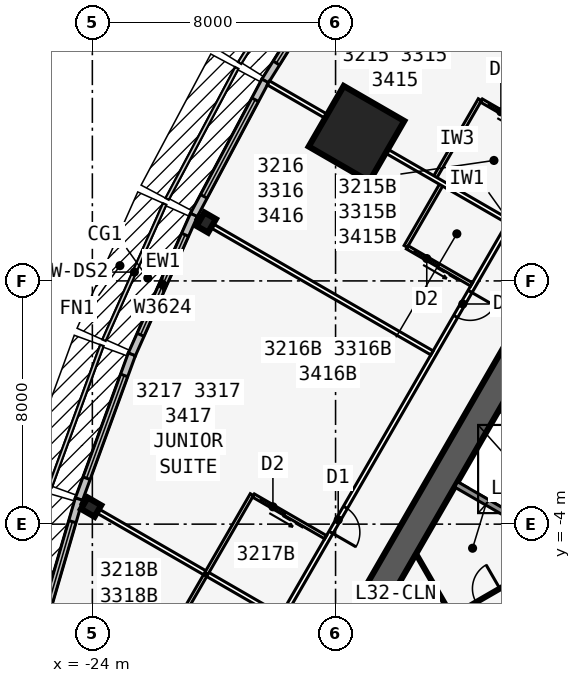
"""IFC4 building model, lengths in metres.
Left out: names, types, materials, properties, quantities, classifications, styles, units other than length and angle.
Written with IfcOpenShell. Run it as: python <this file> out.ifc"""

import sys

from ifc_helpers import new_model, si_unit, direction, frame, frame_2d, origin, origin_2d, place, context, subcontext, project, spatial, rectangle, i_section, extrude, element, fill, save


model = new_model("IFC4")
c1 = context("Model", 3, precision=1e-05, world=origin(), true_north=direction((0.0, 1.0)))
c2 = subcontext(c1, "Body", "Model", "MODEL_VIEW")
j1 = project(units=[si_unit("LENGTHUNIT", "METRE"), si_unit("PLANEANGLEUNIT", "RADIAN")], contexts=[c1])
p1 = place(None, origin())
s1 = spatial("IfcSite", under=j1, at=p1, CompositionType="ELEMENT")
p2 = place(p1, origin())
s2 = spatial("IfcBuilding", under=s1, at=p2, CompositionType="ELEMENT")
p3 = place(p2, frame((0.0, 0.0, 124.9)))
s3 = spatial("IfcBuildingStorey", under=s2, at=p3, CompositionType="ELEMENT", Elevation=124.9)
p4 = place(p3, frame((0.0, 19.052, 0.0), z_axis=(0.0, 0.0, 1.0), x_axis=(-0.499999749417, -0.866025548458, 0.0)))
e1 = element("IfcWall", 1, at=p4, inside=s3, PredefinedType="SHEAR", context=c2, shape_type="SweptSolid", body=[
    extrude(rectangle(XDim=33.0, YDim=0.9, at=frame_2d((16.5, 0.0))), origin(), (0.0, 0.0, 1.0), 3.4),
])
p5 = place(p4, frame((14.15, 0.0, 0.0)))
e2 = element("IfcOpeningElement", 2, at=p5, cuts=e1, PredefinedType="OPENING", context=c2, shape_type="SweptSolid", body=[
    extrude(rectangle(XDim=1.8, YDim=2.13, at=frame_2d((0.9, 1.065))), frame((0.0, 0.46, 0.0), z_axis=(0.0, -1.0, 0.0), x_axis=(1.0, 0.0, 0.0)), (0.0, 0.0, 1.0), 0.92),
])
p6 = place(p4, frame((12.6, 0.0, 0.0)))
e3 = element("IfcOpeningElement", 3, at=p6, cuts=e1, PredefinedType="OPENING", context=c2, shape_type="SweptSolid", body=[
    extrude(rectangle(XDim=1.0, YDim=2.13, at=frame_2d((0.5, 1.065))), frame((0.0, 0.46, 0.0), z_axis=(0.0, -1.0, 0.0), x_axis=(1.0, 0.0, 0.0)), (0.0, 0.0, 1.0), 0.92),
])
for number, where, z_axis, x_axis in (
    (4, (-7.879, -1.744, 0.0), (0.0, 0.0, 1.0), (-0.866, 0.5, 0.0)),
    (5, (-9.329, -4.256, 0.0), (0.0, 0.0, 1.0), (-0.866, 0.5, 0.0)),
):
    element("IfcWall", number, at=place(p3, frame(where, z_axis=z_axis, x_axis=x_axis)), inside=s3, PredefinedType="SOLIDWALL", context=c2, shape_type="SweptSolid", body=[
        extrude(rectangle(XDim=3.125, YDim=0.2, at=frame_2d((1.562, 0.0))), origin(), (0.0, 0.0, 1.0), 3.235),
    ])
for number, where, z_axis, x_axis in (
    (6, (-20.254, 5.92, 0.0), (0.0, 0.0, 1.0), (-0.866, 0.5, 0.0)),
    (7, (-24.041, -3.44, 0.0), (0.0, 0.0, 1.0), (-0.5, -0.866, 0.0)),
):
    element("IfcColumn", number, at=place(p3, frame(where, z_axis=z_axis, x_axis=x_axis)), inside=s3, PredefinedType="COLUMN", context=c2, shape_type="SweptSolid", body=[
        extrude(i_section(OverallWidth=0.437, OverallDepth=0.513, WebThickness=0.061, FlangeThickness=0.097, at=origin_2d()), origin(), (0.0, 0.0, 1.0), 3.4),
    ])
p7 = place(p3, frame((-15.312, 8.84, 0.0), z_axis=(0.0, 0.0, 1.0), x_axis=(-0.866025403784, 0.5, 0.0)))
e8 = element("IfcColumn", 8, at=p7, inside=s3, PredefinedType="COLUMN", context=c2, shape_type="SweptSolid", body=[
    extrude(rectangle(XDim=2.3, YDim=2.3, at=origin_2d()), origin(), (0.0, 0.0, 1.0), 3.4),
])
p8 = place(p3, frame((-15.667, 14.814, 0.0), z_axis=(0.0, 0.0, 1.0), x_axis=(-0.529990167382, -0.84800378683, 0.0)))
e9 = element("IfcWall", 9, at=p8, inside=s3, PredefinedType="STANDARD", context=c2, shape_type="SweptSolid", body=[
    extrude(rectangle(XDim=5.003, YDim=0.25, at=frame_2d((2.501, 0.0))), origin(), (0.0, 0.0, 1.0), 3.235),
])
p9 = place(p8, frame((0.701, 0.0, 0.45)))
e10 = element("IfcOpeningElement", 10, at=p9, cuts=e9, PredefinedType="OPENING", context=c2, shape_type="SweptSolid", body=[
    extrude(rectangle(XDim=3.6, YDim=2.4, at=frame_2d((1.8, 1.2))), frame((0.0, 0.135, 0.0), z_axis=(0.0, -1.0, 0.0), x_axis=(1.0, 0.0, 0.0)), (0.0, 0.0, 1.0), 0.27),
])
p10 = place(p3, frame((-18.314, 10.579, 0.0), z_axis=(0.0, 0.0, 1.0), x_axis=(-0.469404966864, -0.882982999317, 0.0)))
e11 = element("IfcWall", 11, at=p10, inside=s3, PredefinedType="STANDARD", context=c2, shape_type="SweptSolid", body=[
    extrude(rectangle(XDim=5.003, YDim=0.25, at=frame_2d((2.501, 0.0))), origin(), (0.0, 0.0, 1.0), 3.235),
])
p11 = place(p10, frame((0.701, 0.0, 0.45)))
e12 = element("IfcOpeningElement", 12, at=p11, cuts=e11, PredefinedType="OPENING", context=c2, shape_type="SweptSolid", body=[
    extrude(rectangle(XDim=3.6, YDim=2.4, at=frame_2d((1.8, 1.2))), frame((0.0, 0.135, 0.0), z_axis=(0.0, -1.0, 0.0), x_axis=(1.0, 0.0, 0.0)), (0.0, 0.0, 1.0), 0.27),
])
p12 = place(p3, frame((-20.659, 6.169, 0.0), z_axis=(0.0, 0.0, 1.0), x_axis=(-0.406832200364, -0.913502906808, 0.0)))
e13 = element("IfcWall", 13, at=p12, inside=s3, PredefinedType="STANDARD", context=c2, shape_type="SweptSolid", body=[
    extrude(rectangle(XDim=5.028, YDim=0.25, at=frame_2d((2.514, 0.0))), origin(), (0.0, 0.0, 1.0), 3.235),
])
p13 = place(p12, frame((0.714, 0.0, 0.45)))
e14 = element("IfcOpeningElement", 14, at=p13, cuts=e13, PredefinedType="OPENING", context=c2, shape_type="SweptSolid", body=[
    extrude(rectangle(XDim=3.6, YDim=2.4, at=frame_2d((1.8, 1.2))), frame((0.0, 0.135, 0.0), z_axis=(0.0, -1.0, 0.0), x_axis=(1.0, 0.0, 0.0)), (0.0, 0.0, 1.0), 0.27),
])
p14 = place(p3, frame((-22.701, 1.584, 0.0), z_axis=(0.0, 0.0, 1.0), x_axis=(-0.343225593282, -0.939252996863, 0.0)))
e15 = element("IfcWall", 15, at=p14, inside=s3, PredefinedType="STANDARD", context=c2, shape_type="SweptSolid", body=[
    extrude(rectangle(XDim=5.076, YDim=0.25, at=frame_2d((2.538, 0.0))), origin(), (0.0, 0.0, 1.0), 3.235),
])
p15 = place(p14, frame((0.738, 0.0, 0.45)))
e16 = element("IfcOpeningElement", 16, at=p15, cuts=e15, PredefinedType="OPENING", context=c2, shape_type="SweptSolid", body=[
    extrude(rectangle(XDim=3.6, YDim=2.4, at=frame_2d((1.8, 1.2))), frame((0.0, 0.135, 0.0), z_axis=(0.0, -1.0, 0.0), x_axis=(1.0, 0.0, 0.0)), (0.0, 0.0, 1.0), 0.27),
])
p16 = place(p3, frame((-24.441, -3.175, 0.0), z_axis=(0.0, 0.0, 1.0), x_axis=(-0.279528287117, -0.960137457191, 0.0)))
e17 = element("IfcWall", 17, at=p16, inside=s3, PredefinedType="STANDARD", context=c2, shape_type="SweptSolid", body=[
    extrude(rectangle(XDim=5.148, YDim=0.25, at=frame_2d((2.574, 0.0))), origin(), (0.0, 0.0, 1.0), 3.235),
])
p17 = place(p16, frame((0.774, 0.0, 0.45)))
e18 = element("IfcOpeningElement", 18, at=p17, cuts=e17, PredefinedType="OPENING", context=c2, shape_type="SweptSolid", body=[
    extrude(rectangle(XDim=3.6, YDim=2.4, at=frame_2d((1.8, 1.2))), frame((0.0, 0.135, 0.0), z_axis=(0.0, -1.0, 0.0), x_axis=(1.0, 0.0, 0.0)), (0.0, 0.0, 1.0), 0.27),
])
p18 = place(p3, frame((-0.5, 22.836, 0.0), z_axis=(0.0, 0.0, 1.0), x_axis=(-0.500001677587, -0.866024435227, 0.0)))
e19 = element("IfcWall", 19, at=p18, inside=s3, PredefinedType="PARTITIONING", context=c2, shape_type="SweptSolid", body=[
    extrude(rectangle(XDim=39.054, YDim=0.15, at=frame_2d((19.527, 0.0))), origin(), (0.0, 0.0, 1.0), 3.235),
])
p19 = place(p18, frame((0.352, 0.0, 0.0)))
e20 = element("IfcOpeningElement", 20, at=p19, cuts=e19, PredefinedType="OPENING", context=c2, shape_type="SweptSolid", body=[
    extrude(rectangle(XDim=0.95, YDim=2.13, at=frame_2d((0.475, 1.065))), frame((0.0, 0.085, 0.0), z_axis=(0.0, -1.0, 0.0), x_axis=(1.0, 0.0, 0.0)), (0.0, 0.0, 1.0), 0.17),
])
p20 = place(p18, frame((5.952, 0.0, 0.0)))
e21 = element("IfcOpeningElement", 21, at=p20, cuts=e19, PredefinedType="OPENING", context=c2, shape_type="SweptSolid", body=[
    extrude(rectangle(XDim=0.95, YDim=2.13, at=frame_2d((0.475, 1.065))), frame((0.0, 0.085, 0.0), z_axis=(0.0, -1.0, 0.0), x_axis=(1.0, 0.0, 0.0)), (0.0, 0.0, 1.0), 0.17),
])
p21 = place(p18, frame((12.152, 0.0, 0.0)))
e22 = element("IfcOpeningElement", 22, at=p21, cuts=e19, PredefinedType="OPENING", context=c2, shape_type="SweptSolid", body=[
    extrude(rectangle(XDim=0.95, YDim=2.13, at=frame_2d((0.475, 1.065))), frame((0.0, 0.085, 0.0), z_axis=(0.0, -1.0, 0.0), x_axis=(1.0, 0.0, 0.0)), (0.0, 0.0, 1.0), 0.17),
])
p22 = place(p18, frame((15.352, 0.0, 0.0)))
e23 = element("IfcOpeningElement", 23, at=p22, cuts=e19, PredefinedType="OPENING", context=c2, shape_type="SweptSolid", body=[
    extrude(rectangle(XDim=0.95, YDim=2.13, at=frame_2d((0.475, 1.065))), frame((0.0, 0.085, 0.0), z_axis=(0.0, -1.0, 0.0), x_axis=(1.0, 0.0, 0.0)), (0.0, 0.0, 1.0), 0.17),
])
p23 = place(p18, frame((22.152, 0.0, 0.0)))
e24 = element("IfcOpeningElement", 24, at=p23, cuts=e19, PredefinedType="OPENING", context=c2, shape_type="SweptSolid", body=[
    extrude(rectangle(XDim=0.95, YDim=2.13, at=frame_2d((0.475, 1.065))), frame((0.0, 0.085, 0.0), z_axis=(0.0, -1.0, 0.0), x_axis=(1.0, 0.0, 0.0)), (0.0, 0.0, 1.0), 0.17),
])
p24 = place(p18, frame((30.352, 0.0, 0.0)))
e25 = element("IfcOpeningElement", 25, at=p24, cuts=e19, PredefinedType="OPENING", context=c2, shape_type="SweptSolid", body=[
    extrude(rectangle(XDim=0.95, YDim=2.13, at=frame_2d((0.475, 1.065))), frame((0.0, 0.085, 0.0), z_axis=(0.0, -1.0, 0.0), x_axis=(1.0, 0.0, 0.0)), (0.0, 0.0, 1.0), 0.17),
])
p25 = place(p18, frame((37.752, 0.0, 0.0)))
e26 = element("IfcOpeningElement", 26, at=p25, cuts=e19, PredefinedType="OPENING", context=c2, shape_type="SweptSolid", body=[
    extrude(rectangle(XDim=0.95, YDim=2.13, at=frame_2d((0.475, 1.065))), frame((0.0, 0.085, 0.0), z_axis=(0.0, -1.0, 0.0), x_axis=(1.0, 0.0, 0.0)), (0.0, 0.0, 1.0), 0.17),
])
p26 = place(p3, frame((-7.829, 10.293, 0.0), z_axis=(0.0, 0.0, 1.0), x_axis=(-0.866027015393, 0.499997208602, 0.0)))
e27 = element("IfcWall", 27, at=p26, inside=s3, PredefinedType="PARTITIONING", context=c2, shape_type="SweptSolid", body=[
    extrude(rectangle(XDim=8.922, YDim=0.15, at=frame_2d((4.461, 0.0))), origin(), (0.0, 0.0, 1.0), 2.389),
])
p27 = place(p3, frame((-10.329, 5.963, 0.0), z_axis=(0.0, 0.0, 1.0), x_axis=(-0.866025170687, 0.500000403736, 0.0)))
e28 = element("IfcWall", 28, at=p27, inside=s3, PredefinedType="PARTITIONING", context=c2, shape_type="SweptSolid", body=[
    extrude(rectangle(XDim=9.099, YDim=0.15, at=frame_2d((4.549, 0.0))), origin(), (0.0, 0.0, 1.0), 2.389),
])
p28 = place(p3, frame((-12.829, 1.633, 0.0), z_axis=(0.0, 0.0, 1.0), x_axis=(-0.866027015393, 0.499997208602, 0.0)))
e29 = element("IfcWall", 29, at=p28, inside=s3, PredefinedType="PARTITIONING", context=c2, shape_type="SweptSolid", body=[
    extrude(rectangle(XDim=8.922, YDim=0.15, at=frame_2d((4.461, 0.0))), origin(), (0.0, 0.0, 1.0), 2.389),
])
p29 = place(p3, frame((-17.829, -7.027, 0.0), z_axis=(0.0, 0.0, 1.0), x_axis=(-0.866029804378, 0.499992377871, 0.0)))
e30 = element("IfcWall", 30, at=p29, inside=s3, PredefinedType="PARTITIONING", context=c2, shape_type="SweptSolid", body=[
    extrude(rectangle(XDim=7.516, YDim=0.15, at=frame_2d((3.758, 0.0))), origin(), (0.0, 0.0, 1.0), 2.389),
])
p30 = place(p3, frame((-11.253, 9.961, 0.0), z_axis=(0.0, 0.0, 1.0), x_axis=(-0.499990139034, -0.866031096941, 0.0)))
e31 = element("IfcWall", 31, at=p30, inside=s3, PredefinedType="PLUMBINGWALL", context=c2, shape_type="SweptSolid", body=[
    extrude(rectangle(XDim=3.0, YDim=0.12, at=frame_2d((1.5, 0.0))), origin(), (0.0, 0.0, 1.0), 3.235),
])
p31 = place(p3, frame((-8.829, 8.561, 0.0), z_axis=(0.0, 0.0, 1.0), x_axis=(-0.866035715982, 0.499982138324, 0.0)))
e32 = element("IfcWall", 32, at=p31, inside=s3, PredefinedType="PLUMBINGWALL", context=c2, shape_type="SweptSolid", body=[
    extrude(rectangle(XDim=2.74, YDim=0.12, at=frame_2d((1.37, 0.0))), origin(), (0.0, 0.0, 1.0), 3.235),
])
p32 = place(p31, frame((1.55, 0.0, 0.0)))
e33 = element("IfcOpeningElement", 33, at=p32, cuts=e32, PredefinedType="OPENING", context=c2, shape_type="SweptSolid", body=[
    extrude(rectangle(XDim=0.9, YDim=2.13, at=frame_2d((0.45, 1.065))), frame((0.0, 0.07, 0.0), z_axis=(0.0, -1.0, 0.0), x_axis=(1.0, 0.0, 0.0)), (0.0, 0.0, 1.0), 0.14),
])
p33 = place(p3, frame((-12.493, 7.213, 0.0), z_axis=(0.0, 0.0, 1.0), x_axis=(-0.500077600433, -0.865980596518, 0.0)))
e34 = element("IfcWall", 34, at=p33, inside=s3, PredefinedType="PLUMBINGWALL", context=c2, shape_type="SweptSolid", body=[
    extrude(rectangle(XDim=2.4, YDim=0.12, at=frame_2d((1.2, 0.0))), origin(), (0.0, 0.0, 1.0), 3.235),
])
p34 = place(p3, frame((-11.529, 3.885, 0.0), z_axis=(0.0, 0.0, 1.0), x_axis=(-0.866023955769, 0.500002508028, 0.0)))
e35 = element("IfcWall", 35, at=p34, inside=s3, PredefinedType="PLUMBINGWALL", context=c2, shape_type="SweptSolid", body=[
    extrude(rectangle(XDim=2.44, YDim=0.12, at=frame_2d((1.22, 0.0))), origin(), (0.0, 0.0, 1.0), 3.235),
])
p35 = place(p34, frame((1.25, 0.0, 0.0)))
e36 = element("IfcOpeningElement", 36, at=p35, cuts=e35, PredefinedType="OPENING", context=c2, shape_type="SweptSolid", body=[
    extrude(rectangle(XDim=0.9, YDim=2.13, at=frame_2d((0.45, 1.065))), frame((0.0, 0.07, 0.0), z_axis=(0.0, -1.0, 0.0), x_axis=(1.0, 0.0, 0.0)), (0.0, 0.0, 1.0), 0.14),
])
p36 = place(p3, frame((-18.753, -3.029, 0.0), z_axis=(0.0, 0.0, 1.0), x_axis=(-0.50002537861, -0.866010750942, 0.0)))
e37 = element("IfcWall", 37, at=p36, inside=s3, PredefinedType="PLUMBINGWALL", context=c2, shape_type="SweptSolid", body=[
    extrude(rectangle(XDim=3.0, YDim=0.12, at=frame_2d((1.5, 0.0))), origin(), (0.0, 0.0, 1.0), 3.235),
])
p37 = place(p3, frame((-16.329, -4.429, 0.0), z_axis=(0.0, 0.0, 1.0), x_axis=(-0.865997131366, 0.500048966069, 0.0)))
e38 = element("IfcWall", 38, at=p37, inside=s3, PredefinedType="PLUMBINGWALL", context=c2, shape_type="SweptSolid", body=[
    extrude(rectangle(XDim=2.74, YDim=0.12, at=frame_2d((1.37, 0.0))), origin(), (0.0, 0.0, 1.0), 3.235),
])
p38 = place(p37, frame((1.55, 0.0, 0.0)))
e39 = element("IfcOpeningElement", 39, at=p38, cuts=e38, PredefinedType="OPENING", context=c2, shape_type="SweptSolid", body=[
    extrude(rectangle(XDim=0.9, YDim=2.13, at=frame_2d((0.45, 1.065))), frame((0.0, 0.07, 0.0), z_axis=(0.0, -1.0, 0.0), x_axis=(1.0, 0.0, 0.0)), (0.0, 0.0, 1.0), 0.14),
])
p39 = place(p3, frame((-20.253, -5.627, 0.0), z_axis=(0.0, 0.0, 1.0), x_axis=(-0.499990139034, -0.866031096941, 0.0)))
e40 = element("IfcWall", 40, at=p39, inside=s3, PredefinedType="PLUMBINGWALL", context=c2, shape_type="SweptSolid", body=[
    extrude(rectangle(XDim=3.0, YDim=0.12, at=frame_2d((1.5, 0.0))), origin(), (0.0, 0.0, 1.0), 3.235),
])
p40 = place(p3, frame((-12.719, -9.076, 0.0), z_axis=(0.0, 0.0, 1.0), x_axis=(-0.499952404951, 0.866052881055, 0.0)))
e41 = element("IfcWall", 41, at=p40, inside=s3, PredefinedType="SOLIDWALL", context=c2, shape_type="SweptSolid", body=[
    extrude(rectangle(XDim=3.002, YDim=0.2, at=frame_2d((1.501, 0.0))), origin(), (0.0, 0.0, 1.0), 3.235),
])
p41 = place(p3, frame((-10.986, -9.076, 0.0), z_axis=(0.0, 0.0, 1.0), x_axis=(-0.499999210213, 0.866025859768, 0.0)))
e42 = element("IfcWall", 42, at=p41, inside=s3, PredefinedType="PARTITIONING", context=c2, shape_type="SweptSolid", body=[
    extrude(rectangle(XDim=4.734, YDim=0.1, at=frame_2d((2.367, 0.0))), origin(), (0.0, 0.0, 1.0), 3.235),
])
p42 = place(p41, frame((0.734, 0.0, 0.0)))
e43 = element("IfcOpeningElement", 43, at=p42, cuts=e42, PredefinedType="OPENING", context=c2, shape_type="SweptSolid", body=[
    extrude(rectangle(XDim=0.9, YDim=2.13, at=frame_2d((0.45, 1.065))), frame((0.0, 0.06, 0.0), z_axis=(0.0, -1.0, 0.0), x_axis=(1.0, 0.0, 0.0)), (0.0, 0.0, 1.0), 0.12),
])
p43 = place(p3, frame((-12.17, -7.026, 0.0), z_axis=(0.0, 0.0, 1.0), x_axis=(0.866015833478, 0.50001657589, 0.0)))
e44 = element("IfcWall", 44, at=p43, inside=s3, PredefinedType="PARTITIONING", context=c2, shape_type="SweptSolid", body=[
    extrude(rectangle(XDim=2.275, YDim=0.1, at=frame_2d((1.138, 0.0))), origin(), (0.0, 0.0, 1.0), 3.235),
])
p44 = place(p43, frame((0.915, 0.0, 0.0)))
e45 = element("IfcOpeningElement", 45, at=p44, cuts=e44, PredefinedType="OPENING", context=c2, shape_type="SweptSolid", body=[
    extrude(rectangle(XDim=0.9, YDim=2.13, at=frame_2d((0.45, 1.065))), frame((0.0, 0.06, 0.0), z_axis=(0.0, -1.0, 0.0), x_axis=(1.0, 0.0, 0.0)), (0.0, 0.0, 1.0), 0.12),
])
p45 = place(p9, origin())
e46 = element("IfcWindow", 46, at=p45, inside=s3, PartitioningType="SINGLE_PANEL", PredefinedType="WINDOW", context=c2, shape_type="SweptSolid", body=[
    extrude(rectangle(XDim=3.6, YDim=2.4, at=frame_2d((1.8, 1.2))), frame((0.0, 0.03, 0.0), z_axis=(0.0, -1.0, 0.0), x_axis=(1.0, 0.0, 0.0)), (0.0, 0.0, 1.0), 0.06),
])
fill(e10, e46)
p46 = place(p11, origin())
e47 = element("IfcWindow", 47, at=p46, inside=s3, PartitioningType="SINGLE_PANEL", PredefinedType="WINDOW", context=c2, shape_type="SweptSolid", body=[
    extrude(rectangle(XDim=3.6, YDim=2.4, at=frame_2d((1.8, 1.2))), frame((0.0, 0.03, 0.0), z_axis=(0.0, -1.0, 0.0), x_axis=(1.0, 0.0, 0.0)), (0.0, 0.0, 1.0), 0.06),
])
fill(e12, e47)
p47 = place(p13, origin())
e48 = element("IfcWindow", 48, at=p47, inside=s3, PartitioningType="SINGLE_PANEL", PredefinedType="WINDOW", context=c2, shape_type="SweptSolid", body=[
    extrude(rectangle(XDim=3.6, YDim=2.4, at=frame_2d((1.8, 1.2))), frame((0.0, 0.03, 0.0), z_axis=(0.0, -1.0, 0.0), x_axis=(1.0, 0.0, 0.0)), (0.0, 0.0, 1.0), 0.06),
])
fill(e14, e48)
p48 = place(p15, origin())
e49 = element("IfcWindow", 49, at=p48, inside=s3, PartitioningType="SINGLE_PANEL", PredefinedType="WINDOW", context=c2, shape_type="SweptSolid", body=[
    extrude(rectangle(XDim=3.6, YDim=2.4, at=frame_2d((1.8, 1.2))), frame((0.0, 0.03, 0.0), z_axis=(0.0, -1.0, 0.0), x_axis=(1.0, 0.0, 0.0)), (0.0, 0.0, 1.0), 0.06),
])
fill(e16, e49)
p49 = place(p17, origin())
e50 = element("IfcWindow", 50, at=p49, inside=s3, PartitioningType="SINGLE_PANEL", PredefinedType="WINDOW", context=c2, shape_type="SweptSolid", body=[
    extrude(rectangle(XDim=3.6, YDim=2.4, at=frame_2d((1.8, 1.2))), frame((0.0, 0.03, 0.0), z_axis=(0.0, -1.0, 0.0), x_axis=(1.0, 0.0, 0.0)), (0.0, 0.0, 1.0), 0.06),
])
fill(e18, e50)
p50 = place(p32, origin())
e51 = element("IfcDoor", 51, at=p50, inside=s3, OperationType="SLIDING_TO_LEFT", PredefinedType="DOOR", context=c2, shape_type="SweptSolid", body=[
    extrude(rectangle(XDim=0.9, YDim=2.13, at=frame_2d((0.45, 1.065))), frame((0.0, 0.025, 0.0), z_axis=(0.0, -1.0, 0.0), x_axis=(1.0, 0.0, 0.0)), (0.0, 0.0, 1.0), 0.05),
])
fill(e33, e51)
p51 = place(p35, origin())
e52 = element("IfcDoor", 52, at=p51, inside=s3, OperationType="SLIDING_TO_LEFT", PredefinedType="DOOR", context=c2, shape_type="SweptSolid", body=[
    extrude(rectangle(XDim=0.9, YDim=2.13, at=frame_2d((0.45, 1.065))), frame((0.0, 0.025, 0.0), z_axis=(0.0, -1.0, 0.0), x_axis=(1.0, 0.0, 0.0)), (0.0, 0.0, 1.0), 0.05),
])
fill(e36, e52)
p52 = place(p23, origin())
e53 = element("IfcDoor", 53, at=p52, inside=s3, OperationType="SINGLE_SWING_LEFT", PredefinedType="DOOR", context=c2, shape_type="SweptSolid", body=[
    extrude(rectangle(XDim=0.95, YDim=2.13, at=frame_2d((0.475, 1.065))), frame((0.0, 0.025, 0.0), z_axis=(0.0, -1.0, 0.0), x_axis=(1.0, 0.0, 0.0)), (0.0, 0.0, 1.0), 0.05),
])
fill(e24, e53)
p53 = place(p38, origin())
e54 = element("IfcDoor", 54, at=p53, inside=s3, OperationType="SLIDING_TO_LEFT", PredefinedType="DOOR", context=c2, shape_type="SweptSolid", body=[
    extrude(rectangle(XDim=0.9, YDim=2.13, at=frame_2d((0.45, 1.065))), frame((0.0, 0.025, 0.0), z_axis=(0.0, -1.0, 0.0), x_axis=(1.0, 0.0, 0.0)), (0.0, 0.0, 1.0), 0.05),
])
fill(e39, e54)
p54 = place(p24, origin())
e55 = element("IfcDoor", 55, at=p54, inside=s3, OperationType="SINGLE_SWING_RIGHT", PredefinedType="DOOR", context=c2, shape_type="SweptSolid", body=[
    extrude(rectangle(XDim=0.95, YDim=2.13, at=frame_2d((0.475, 1.065))), frame((0.0, 0.025, 0.0), z_axis=(0.0, -1.0, 0.0), x_axis=(1.0, 0.0, 0.0)), (0.0, 0.0, 1.0), 0.05),
])
fill(e25, e55)
p55 = place(p44, origin())
e56 = element("IfcDoor", 56, at=p55, inside=s3, OperationType="SINGLE_SWING_RIGHT", PredefinedType="DOOR", context=c2, shape_type="SweptSolid", body=[
    extrude(rectangle(XDim=0.9, YDim=2.13, at=frame_2d((0.45, 1.065))), frame((0.0, 0.025, 0.0), z_axis=(0.0, -1.0, 0.0), x_axis=(1.0, 0.0, 0.0)), (0.0, 0.0, 1.0), 0.05),
])
fill(e45, e56)
save(model, sys.argv[1])
